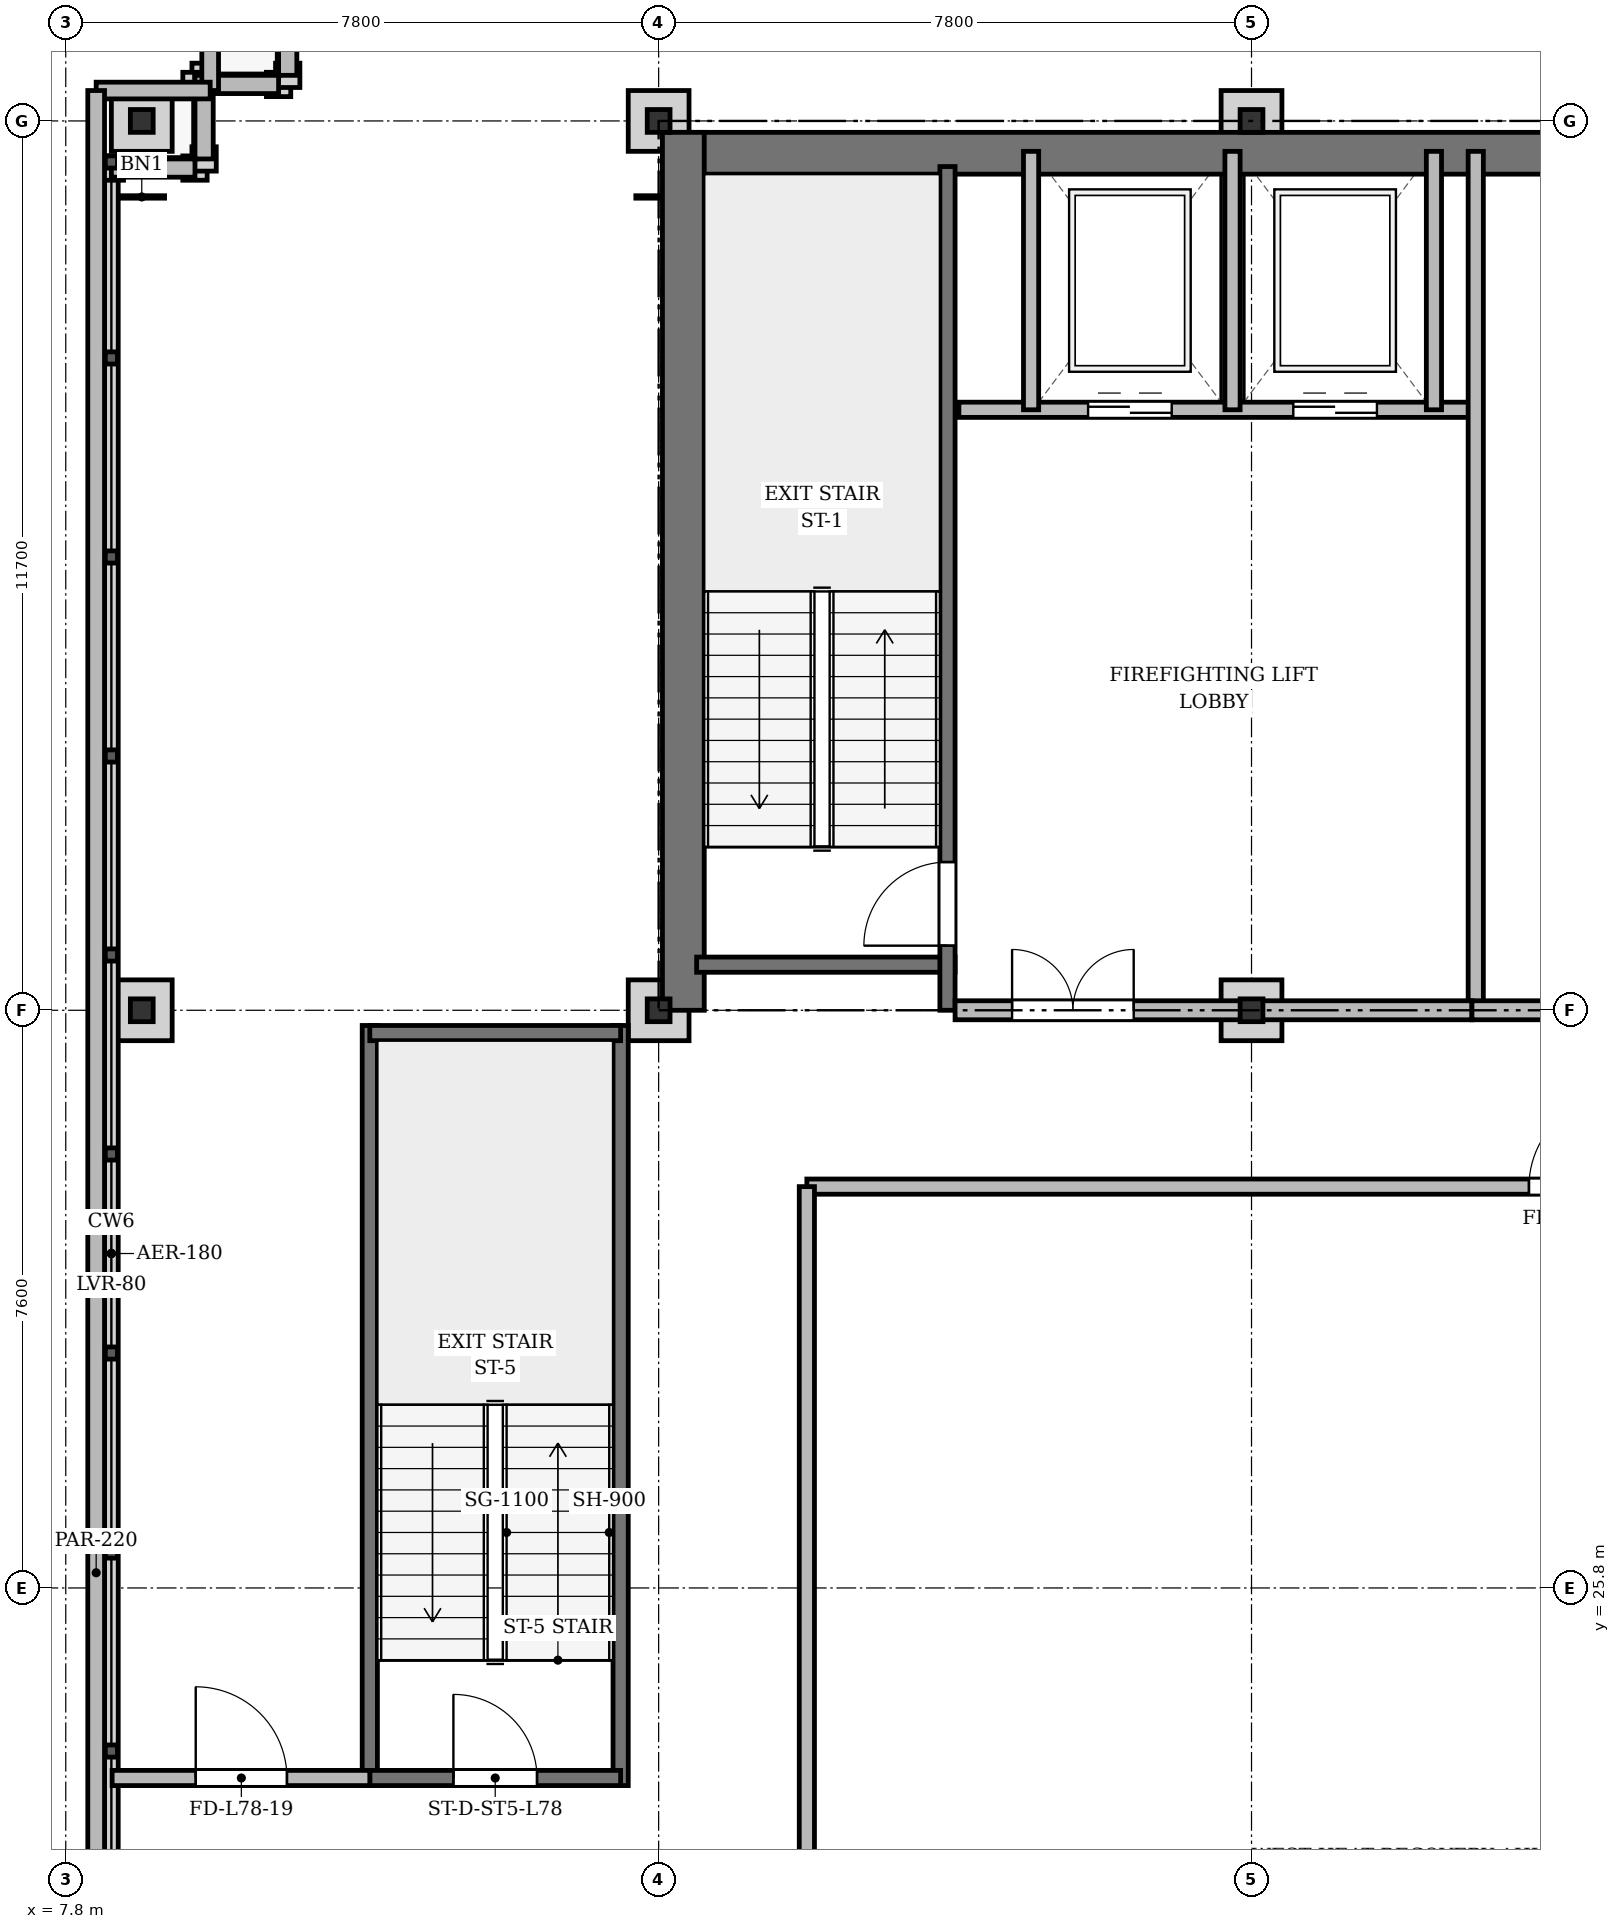
"""IFC4 building model, lengths in metres.
Left out: names, types, materials, properties, quantities, classifications, styles, units other than length and angle.
Written with IfcOpenShell. Run it as: python <this file> out.ifc"""

import sys

from ifc_helpers import new_model, si_unit, direction, frame, frame_2d, origin, origin_2d, place, context, subcontext, project, spatial, rectangle, i_section, extrude, source, transform, mapped, element, fill, save


model = new_model("IFC4")
c1 = context("Model", 3, precision=1e-05, world=origin(), true_north=direction((0.0, 1.0)))
c2 = subcontext(c1, "Body", "Model", "MODEL_VIEW")
j1 = project(units=[si_unit("LENGTHUNIT", "METRE"), si_unit("PLANEANGLEUNIT", "RADIAN")], contexts=[c1])
p1 = place(None, origin())
s1 = spatial("IfcSite", under=j1, at=p1, CompositionType="ELEMENT")
p2 = place(p1, origin())
s2 = spatial("IfcBuilding", under=s1, at=p2, CompositionType="ELEMENT")
p3 = place(p2, frame((0.0, 0.0, 299.1)))
s3 = spatial("IfcBuildingStorey", under=s2, at=p3, CompositionType="ELEMENT", Elevation=299.1)
m1 = source(origin(), c2, "Body", "SweptSolid", [
    extrude(i_section(OverallWidth=0.3, OverallDepth=0.3, WebThickness=0.015, FlangeThickness=0.024, at=origin_2d()), origin(), (0.0, 0.0, 1.0), 4.4),
])
for number, where, z_axis, x_axis in (
    (1, (8.8, 33.4, 0.0), (0.0, 0.0, 1.0), (1.0, 0.0, 0.0)),
    (2, (8.8, 45.1, 0.0), (0.0, 0.0, 1.0), (1.0, 0.0, 0.0)),
    (3, (15.6, 33.4, 0.0), (0.0, 0.0, 1.0), (1.0, 0.0, 0.0)),
    (4, (15.6, 45.1, 0.0), (0.0, 0.0, 1.0), (1.0, 0.0, 0.0)),
    (5, (23.4, 33.4, 0.0), (0.0, 0.0, 1.0), (1.0, 0.0, 0.0)),
    (6, (23.4, 45.1, 0.0), (0.0, 0.0, 1.0), (1.0, 0.0, 0.0)),
):
    element("IfcColumn", number, at=place(p3, frame(where, z_axis=z_axis, x_axis=x_axis)), inside=s3, PredefinedType="COLUMN", context=c2, shape_type="MappedRepresentation", body=[
        mapped(m1, transform((0.0, 0.0, 0.0), x_axis=(1.0, 0.0, 0.0), y_axis=(0.0, 1.0, 0.0), z_axis=(0.0, 0.0, 1.0), scale=1.0)),
    ])
p4 = place(p3, frame((8.4, 44.48, 0.0), z_axis=(0.0, 0.0, 1.0), x_axis=(1.0, 0.0, 0.0)))
e7 = element("IfcWall", 7, at=p4, inside=s3, PredefinedType="SOLIDWALL", context=c2, shape_type="SweptSolid", body=[
    extrude(rectangle(XDim=1.1, YDim=0.24, at=frame_2d((0.55, 0.0))), origin(), (0.0, 0.0, 1.0), 3.62),
])
p5 = place(p3, frame((9.62, 44.6, 0.0), z_axis=(0.0, 0.0, 1.0), x_axis=(0.0, 1.0, 0.0)))
e8 = element("IfcWall", 8, at=p5, inside=s3, PredefinedType="SOLIDWALL", context=c2, shape_type="SweptSolid", body=[
    extrude(rectangle(XDim=1.1, YDim=0.24, at=frame_2d((0.55, 0.0))), origin(), (0.0, 0.0, 1.0), 3.62),
])
for number, where, z_axis, x_axis in (
    (9, (9.5, 45.58, 0.0), (0.0, 0.0, 1.0), (1.0, 0.0, 0.0)),
    (10, (10.72, 45.7, 0.0), (0.0, 0.0, 1.0), (0.0, 1.0, 0.0)),
):
    element("IfcWall", number, at=place(p3, frame(where, z_axis=z_axis, x_axis=x_axis)), inside=s3, PredefinedType="SOLIDWALL", context=c2, shape_type="SweptSolid", body=[
        extrude(rectangle(XDim=1.1, YDim=0.24, at=frame_2d((0.55, 0.0))), origin(), (0.0, 0.0, 1.0), 4.12),
    ])
for number, where, z_axis, x_axis in (
    (11, (9.7, 47.0, 0.0), (0.0, 0.0, 1.0), (0.0, -1.0, 0.0)),
    (12, (9.7, 45.5, 0.0), (0.0, 0.0, 1.0), (-1.0, 0.0, 0.0)),
):
    element("IfcWall", number, at=place(p3, frame(where, z_axis=z_axis, x_axis=x_axis)), inside=s3, PredefinedType="PARAPET", context=c2, shape_type="SweptSolid", body=[
        extrude(rectangle(XDim=1.5, YDim=0.22, at=frame_2d((0.75, 0.0))), origin(), (0.0, 0.0, 1.0), 1.08),
    ])
p6 = place(p3, frame((8.2, 45.5, 0.0), z_axis=(0.0, 0.0, 1.0), x_axis=(0.0, -1.0, 0.0)))
e13 = element("IfcWall", 13, at=p6, inside=s3, PredefinedType="PARAPET", context=c2, shape_type="SweptSolid", body=[
    extrude(rectangle(XDim=39.0, YDim=0.22, at=frame_2d((19.5, 0.0))), origin(), (0.0, 0.0, 1.0), 1.08),
])
p7 = place(p3, frame((15.65, 44.675, 0.0), z_axis=(0.0, 0.0, 1.0), x_axis=(1.0, 0.0, 0.0)))
e14 = element("IfcWall", 14, at=p7, inside=s3, PredefinedType="SHEAR", context=c2, shape_type="SweptSolid", body=[
    extrude(rectangle(XDim=43.1, YDim=0.55, at=frame_2d((21.55, 0.0))), origin(), (0.0, 0.0, 1.0), 4.12),
])
p8 = place(p3, frame((15.925, 33.4, 0.0), z_axis=(0.0, 0.0, 1.0), x_axis=(0.0, 1.0, 0.0)))
e15 = element("IfcWall", 15, at=p8, inside=s3, PredefinedType="SHEAR", context=c2, shape_type="SweptSolid", body=[
    extrude(rectangle(XDim=11.55, YDim=0.55, at=frame_2d((5.775, 0.0))), origin(), (0.0, 0.0, 1.0), 4.12),
])
p9 = place(p3, frame((16.1, 34.0, 0.0), z_axis=(0.0, 0.0, 1.0), x_axis=(1.0, 0.0, 0.0)))
e16 = element("IfcWall", 16, at=p9, inside=s3, PredefinedType="SHEAR", context=c2, shape_type="SweptSolid", body=[
    extrude(rectangle(XDim=3.4, YDim=0.2, at=frame_2d((1.7, 0.0))), origin(), (0.0, 0.0, 1.0), 4.12),
])
p10 = place(p3, frame((19.4, 33.4, 0.0), z_axis=(0.0, 0.0, 1.0), x_axis=(0.0, 1.0, 0.0)))
e17 = element("IfcWall", 17, at=p10, inside=s3, PredefinedType="SHEAR", context=c2, shape_type="SweptSolid", body=[
    extrude(rectangle(XDim=11.1, YDim=0.2, at=frame_2d((5.55, 0.0))), origin(), (0.0, 0.0, 1.0), 4.12),
])
p11 = place(p10, frame((0.85, 0.0, 0.0)))
e18 = element("IfcOpeningElement", 18, at=p11, cuts=e17, PredefinedType="OPENING", context=c2, shape_type="SweptSolid", body=[
    extrude(rectangle(XDim=1.1, YDim=2.15, at=frame_2d((0.55, 1.075))), frame((0.0, 0.11, 0.0), z_axis=(0.0, -1.0, 0.0), x_axis=(1.0, 0.0, 0.0)), (0.0, 0.0, 1.0), 0.22),
])
for number, where, z_axis, x_axis in (
    (19, (11.8, 23.2, 0.0), (0.0, 0.0, 1.0), (0.0, 1.0, 0.0)),
    (20, (15.1, 23.2, 0.0), (0.0, 0.0, 1.0), (0.0, 1.0, 0.0)),
):
    element("IfcWall", number, at=place(p3, frame(where, z_axis=z_axis, x_axis=x_axis)), inside=s3, PredefinedType="SHEAR", context=c2, shape_type="SweptSolid", body=[
        extrude(rectangle(XDim=10.0, YDim=0.2, at=frame_2d((5.0, 0.0))), origin(), (0.0, 0.0, 1.0), 4.12),
    ])
p12 = place(p3, frame((11.8, 33.1, 0.0), z_axis=(0.0, 0.0, 1.0), x_axis=(1.0, 0.0, 0.0)))
e21 = element("IfcWall", 21, at=p12, inside=s3, PredefinedType="SHEAR", context=c2, shape_type="SweptSolid", body=[
    extrude(rectangle(XDim=3.3, YDim=0.2, at=frame_2d((1.65, 0.0))), origin(), (0.0, 0.0, 1.0), 4.12),
])
p13 = place(p3, frame((11.8, 23.3, 0.0), z_axis=(0.0, 0.0, 1.0), x_axis=(1.0, 0.0, 0.0)))
e22 = element("IfcWall", 22, at=p13, inside=s3, PredefinedType="SHEAR", context=c2, shape_type="SweptSolid", body=[
    extrude(rectangle(XDim=3.3, YDim=0.2, at=frame_2d((1.65, 0.0))), origin(), (0.0, 0.0, 1.0), 4.12),
])
p14 = place(p13, frame((1.1, 0.0, 0.0)))
e23 = element("IfcOpeningElement", 23, at=p14, cuts=e22, PredefinedType="OPENING", context=c2, shape_type="SweptSolid", body=[
    extrude(rectangle(XDim=1.1, YDim=2.15, at=frame_2d((0.55, 1.075))), frame((0.0, 0.11, 0.0), z_axis=(0.0, -1.0, 0.0), x_axis=(1.0, 0.0, 0.0)), (0.0, 0.0, 1.0), 0.22),
])
p15 = place(p3, frame((19.55, 41.3, 0.0), z_axis=(0.0, 0.0, 1.0), x_axis=(1.0, 0.0, 0.0)))
e24 = element("IfcWall", 24, at=p15, inside=s3, PredefinedType="SOLIDWALL", context=c2, shape_type="SweptSolid", body=[
    extrude(rectangle(XDim=6.75, YDim=0.2, at=frame_2d((3.375, 0.0))), origin(), (0.0, 0.0, 1.0), 4.12),
])
p16 = place(p15, frame((1.7, 0.0, 0.0)))
e25 = element("IfcOpeningElement", 25, at=p16, cuts=e24, PredefinedType="OPENING", context=c2, shape_type="SweptSolid", body=[
    extrude(rectangle(XDim=1.1, YDim=2.15, at=frame_2d((0.55, 1.075))), frame((0.0, 0.11, 0.0), z_axis=(0.0, -1.0, 0.0), x_axis=(1.0, 0.0, 0.0)), (0.0, 0.0, 1.0), 0.22),
])
p17 = place(p15, frame((4.4, 0.0, 0.0)))
e26 = element("IfcOpeningElement", 26, at=p17, cuts=e24, PredefinedType="OPENING", context=c2, shape_type="SweptSolid", body=[
    extrude(rectangle(XDim=1.1, YDim=2.15, at=frame_2d((0.55, 1.075))), frame((0.0, 0.11, 0.0), z_axis=(0.0, -1.0, 0.0), x_axis=(1.0, 0.0, 0.0)), (0.0, 0.0, 1.0), 0.22),
])
for number, where, z_axis, x_axis in (
    (27, (20.5, 41.3, 0.0), (0.0, 0.0, 1.0), (0.0, 1.0, 0.0)),
    (28, (23.15, 41.3, 0.0), (0.0, 0.0, 1.0), (0.0, 1.0, 0.0)),
    (29, (25.8, 41.3, 0.0), (0.0, 0.0, 1.0), (0.0, 1.0, 0.0)),
):
    element("IfcWall", number, at=place(p3, frame(where, z_axis=z_axis, x_axis=x_axis)), inside=s3, PredefinedType="SOLIDWALL", context=c2, shape_type="SweptSolid", body=[
        extrude(rectangle(XDim=3.4, YDim=0.2, at=frame_2d((1.7, 0.0))), origin(), (0.0, 0.0, 1.0), 4.12),
    ])
p18 = place(p3, frame((26.35, 33.4, 0.0), z_axis=(0.0, 0.0, 1.0), x_axis=(0.0, 1.0, 0.0)))
e30 = element("IfcWall", 30, at=p18, inside=s3, PredefinedType="SOLIDWALL", context=c2, shape_type="SweptSolid", body=[
    extrude(rectangle(XDim=11.3, YDim=0.2, at=frame_2d((5.65, 0.0))), origin(), (0.0, 0.0, 1.0), 3.62),
])
p19 = place(p3, frame((19.5, 33.4, 0.0), z_axis=(0.0, 0.0, 1.0), x_axis=(1.0, 0.0, 0.0)))
e31 = element("IfcWall", 31, at=p19, inside=s3, PredefinedType="PARTITIONING", context=c2, shape_type="SweptSolid", body=[
    extrude(rectangle(XDim=6.8, YDim=0.25, at=frame_2d((3.4, 0.0))), origin(), (0.0, 0.0, 1.0), 3.62),
])
p20 = place(p19, frame((0.75, 0.0, 0.0)))
e32 = element("IfcOpeningElement", 32, at=p20, cuts=e31, PredefinedType="OPENING", context=c2, shape_type="SweptSolid", body=[
    extrude(rectangle(XDim=1.6, YDim=2.2, at=frame_2d((0.8, 1.1))), frame((0.0, 0.135, 0.0), z_axis=(0.0, -1.0, 0.0), x_axis=(1.0, 0.0, 0.0)), (0.0, 0.0, 1.0), 0.27),
])
p21 = place(p3, frame((26.3, 33.4, 0.0), z_axis=(0.0, 0.0, 1.0), x_axis=(1.0, 0.0, 0.0)))
e33 = element("IfcWall", 33, at=p21, inside=s3, PredefinedType="PARTITIONING", context=c2, shape_type="SweptSolid", body=[
    extrude(rectangle(XDim=20.7, YDim=0.25, at=frame_2d((10.35, 0.0))), origin(), (0.0, 0.0, 1.0), 3.62),
])
p22 = place(p21, frame((8.5, 0.0, 0.0)))
e34 = element("IfcOpeningElement", 34, at=p22, cuts=e33, PredefinedType="OPENING", context=c2, shape_type="SweptSolid", body=[
    extrude(rectangle(XDim=1.6, YDim=2.2, at=frame_2d((0.8, 1.1))), frame((0.0, 0.135, 0.0), z_axis=(0.0, -1.0, 0.0), x_axis=(1.0, 0.0, 0.0)), (0.0, 0.0, 1.0), 0.27),
])
p23 = place(p3, frame((17.55, 31.08, 0.0), z_axis=(0.0, 0.0, 1.0), x_axis=(1.0, 0.0, 0.0)))
e35 = element("IfcWall", 35, at=p23, inside=s3, PredefinedType="PARTITIONING", context=c2, shape_type="SweptSolid", body=[
    extrude(rectangle(XDim=39.3, YDim=0.2, at=frame_2d((19.65, 0.0))), origin(), (0.0, 0.0, 1.0), 3.62),
])
p24 = place(p23, frame((9.5, 0.0, 0.0)))
e36 = element("IfcOpeningElement", 36, at=p24, cuts=e35, PredefinedType="OPENING", context=c2, shape_type="SweptSolid", body=[
    extrude(rectangle(XDim=1.2, YDim=2.15, at=frame_2d((0.6, 1.075))), frame((0.0, 0.11, 0.0), z_axis=(0.0, -1.0, 0.0), x_axis=(1.0, 0.0, 0.0)), (0.0, 0.0, 1.0), 0.22),
])
p25 = place(p23, frame((24.5, 0.0, 0.0)))
e37 = element("IfcOpeningElement", 37, at=p25, cuts=e35, PredefinedType="OPENING", context=c2, shape_type="SweptSolid", body=[
    extrude(rectangle(XDim=1.2, YDim=2.15, at=frame_2d((0.6, 1.075))), frame((0.0, 0.11, 0.0), z_axis=(0.0, -1.0, 0.0), x_axis=(1.0, 0.0, 0.0)), (0.0, 0.0, 1.0), 0.22),
])
p26 = place(p3, frame((17.55, 13.61, 0.0), z_axis=(0.0, 0.0, 1.0), x_axis=(0.0, 1.0, 0.0)))
e38 = element("IfcWall", 38, at=p26, inside=s3, PredefinedType="PARTITIONING", context=c2, shape_type="SweptSolid", body=[
    extrude(rectangle(XDim=17.47, YDim=0.2, at=frame_2d((8.735, 0.0))), origin(), (0.0, 0.0, 1.0), 3.62),
])
p27 = place(p3, frame((8.41, 23.3, 0.0), z_axis=(0.0, 0.0, 1.0), x_axis=(1.0, 0.0, 0.0)))
e39 = element("IfcWall", 39, at=p27, inside=s3, PredefinedType="PARTITIONING", context=c2, shape_type="SweptSolid", body=[
    extrude(rectangle(XDim=3.39, YDim=0.2, at=frame_2d((1.695, 0.0))), origin(), (0.0, 0.0, 1.0), 3.62),
])
p28 = place(p27, frame((1.1, 0.0, 0.0)))
e40 = element("IfcOpeningElement", 40, at=p28, cuts=e39, PredefinedType="OPENING", context=c2, shape_type="SweptSolid", body=[
    extrude(rectangle(XDim=1.2, YDim=2.15, at=frame_2d((0.6, 1.075))), frame((0.0, 0.11, 0.0), z_axis=(0.0, -1.0, 0.0), x_axis=(1.0, 0.0, 0.0)), (0.0, 0.0, 1.0), 0.22),
])
m2 = source(origin(), c2, "Body", "SweptSolid", [
    extrude(rectangle(XDim=1.1, YDim=2.15, at=frame_2d((0.55, 1.075))), frame((0.0, 0.025, 0.0), z_axis=(0.0, -1.0, 0.0), x_axis=(1.0, 0.0, 0.0)), (0.0, 0.0, 1.0), 0.05),
])
p29 = place(p11, origin())
e41 = element("IfcDoor", 41, at=p29, inside=s3, OperationType="SINGLE_SWING_LEFT", PredefinedType="DOOR", context=c2, shape_type="MappedRepresentation", body=[
    mapped(m2, transform((0.0, 0.0, 0.0), x_axis=(1.0, 0.0, 0.0), y_axis=(0.0, 1.0, 0.0), z_axis=(0.0, 0.0, 1.0), scale=1.0)),
])
fill(e18, e41)
p30 = place(p14, origin())
e42 = element("IfcDoor", 42, at=p30, inside=s3, OperationType="SINGLE_SWING_LEFT", PredefinedType="DOOR", context=c2, shape_type="MappedRepresentation", body=[
    mapped(m2, transform((0.0, 0.0, 0.0), x_axis=(1.0, 0.0, 0.0), y_axis=(0.0, 1.0, 0.0), z_axis=(0.0, 0.0, 1.0), scale=1.0)),
])
fill(e23, e42)
p31 = place(p16, origin())
e43 = element("IfcDoor", 43, at=p31, inside=s3, OperationType="DOUBLE_DOOR_SLIDING", PredefinedType="DOOR", context=c2, shape_type="MappedRepresentation", body=[
    mapped(m2, transform((0.0, 0.0, 0.0), x_axis=(1.0, 0.0, 0.0), y_axis=(0.0, 1.0, 0.0), z_axis=(0.0, 0.0, 1.0), scale=1.0)),
])
fill(e25, e43)
p32 = place(p17, origin())
e44 = element("IfcDoor", 44, at=p32, inside=s3, OperationType="DOUBLE_DOOR_SLIDING", PredefinedType="DOOR", context=c2, shape_type="MappedRepresentation", body=[
    mapped(m2, transform((0.0, 0.0, 0.0), x_axis=(1.0, 0.0, 0.0), y_axis=(0.0, 1.0, 0.0), z_axis=(0.0, 0.0, 1.0), scale=1.0)),
])
fill(e26, e44)
m3 = source(origin(), c2, "Body", "SweptSolid", [
    extrude(rectangle(XDim=1.6, YDim=2.2, at=frame_2d((0.8, 1.1))), frame((0.0, 0.025, 0.0), z_axis=(0.0, -1.0, 0.0), x_axis=(1.0, 0.0, 0.0)), (0.0, 0.0, 1.0), 0.05),
])
p33 = place(p20, origin())
e45 = element("IfcDoor", 45, at=p33, inside=s3, OperationType="DOUBLE_DOOR_SINGLE_SWING", PredefinedType="DOOR", context=c2, shape_type="MappedRepresentation", body=[
    mapped(m3, transform((0.0, 0.0, 0.0), x_axis=(1.0, 0.0, 0.0), y_axis=(0.0, 1.0, 0.0), z_axis=(0.0, 0.0, 1.0), scale=1.0)),
])
fill(e32, e45)
m4 = source(origin(), c2, "Body", "SweptSolid", [
    extrude(rectangle(XDim=1.2, YDim=2.15, at=frame_2d((0.6, 1.075))), frame((0.0, 0.025, 0.0), z_axis=(0.0, -1.0, 0.0), x_axis=(1.0, 0.0, 0.0)), (0.0, 0.0, 1.0), 0.05),
])
p34 = place(p24, origin())
e46 = element("IfcDoor", 46, at=p34, inside=s3, OperationType="SINGLE_SWING_RIGHT", PredefinedType="DOOR", context=c2, shape_type="MappedRepresentation", body=[
    mapped(m4, transform((0.0, 0.0, 0.0), x_axis=(1.0, 0.0, 0.0), y_axis=(0.0, 1.0, 0.0), z_axis=(0.0, 0.0, 1.0), scale=1.0)),
])
fill(e36, e46)
p35 = place(p28, origin())
e47 = element("IfcDoor", 47, at=p35, inside=s3, OperationType="SINGLE_SWING_LEFT", PredefinedType="DOOR", context=c2, shape_type="MappedRepresentation", body=[
    mapped(m4, transform((0.0, 0.0, 0.0), x_axis=(1.0, 0.0, 0.0), y_axis=(0.0, 1.0, 0.0), z_axis=(0.0, 0.0, 1.0), scale=1.0)),
])
fill(e40, e47)
save(model, sys.argv[1])
